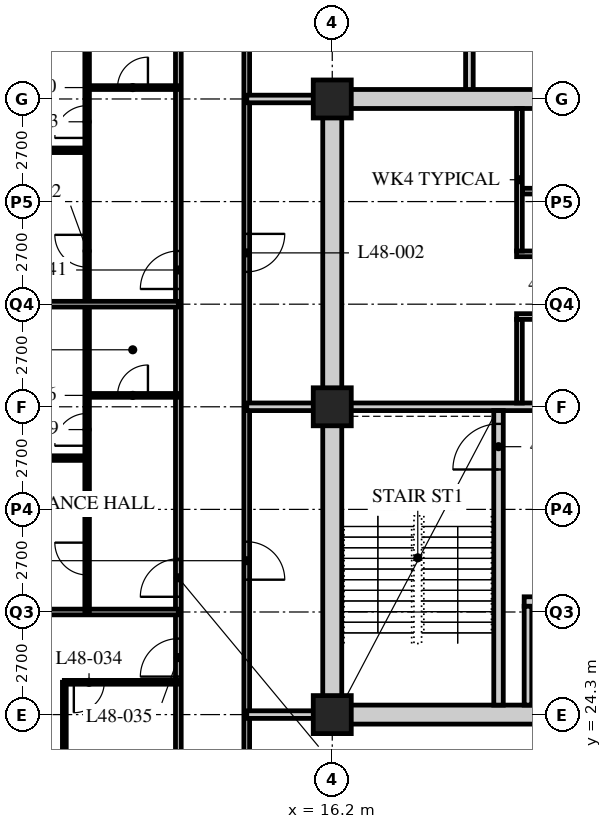
"""IFC4 building model, lengths in metres.
Left out: names, types, materials, properties, quantities, classifications, styles, units other than length and angle.
Written with IfcOpenShell. Run it as: python <this file> out.ifc"""

import sys

from ifc_helpers import new_model, si_unit, direction, frame, frame_2d, origin, origin_2d, place, context, subcontext, project, spatial, rectangle, hollow_rectangle, extrude, element, fill, save


model = new_model("IFC4")
c1 = context("Model", 3, precision=1e-05, world=origin(), true_north=direction((0.0, 1.0)))
c2 = subcontext(c1, "Body", "Model", "MODEL_VIEW")
j1 = project(units=[si_unit("LENGTHUNIT", "METRE"), si_unit("PLANEANGLEUNIT", "RADIAN")], contexts=[c1])
p1 = place(None, origin())
s1 = spatial("IfcSite", under=j1, at=p1, CompositionType="ELEMENT")
p2 = place(p1, origin())
s2 = spatial("IfcBuilding", under=s1, at=p2, CompositionType="ELEMENT")
p3 = place(p2, frame((0.0, 0.0, 188.4)))
s3 = spatial("IfcBuildingStorey", under=s2, at=p3, CompositionType="ELEMENT", Elevation=188.4)
for number, where, z_axis, x_axis in (
    (1, (16.2, 24.3, 0.0), (0.0, 0.0, 1.0), (1.0, 0.0, 0.0)),
    (2, (16.2, 32.4, 0.0), (0.0, 0.0, 1.0), (1.0, 0.0, 0.0)),
    (3, (16.2, 40.5, 0.0), (0.0, 0.0, 1.0), (1.0, 0.0, 0.0)),
):
    element("IfcColumn", number, at=place(p3, frame(where, z_axis=z_axis, x_axis=x_axis)), inside=s3, PredefinedType="COLUMN", context=c2, shape_type="SweptSolid", body=[
        extrude(hollow_rectangle(XDim=1.0, YDim=1.0, WallThickness=0.1, at=origin_2d()), origin(), (0.0, 0.0, 1.0), 3.6),
    ])
p4 = place(p3, frame((12.15, 18.9, 0.0), z_axis=(0.0, 0.0, 1.0), x_axis=(0.0, 1.0, 0.0)))
e4 = element("IfcWall", 4, at=p4, inside=s3, PredefinedType="PARTITIONING", context=c2, shape_type="SweptSolid", body=[
    extrude(rectangle(XDim=28.35, YDim=0.15, at=frame_2d((14.175, 0.0))), origin(), (0.0, 0.0, 1.0), 3.39),
])
p5 = place(p4, frame((2.35, 0.0, 0.0)))
e5 = element("IfcOpeningElement", 5, at=p5, cuts=e4, PredefinedType="OPENING", context=c2, shape_type="SweptSolid", body=[
    extrude(rectangle(XDim=1.0, YDim=2.1, at=frame_2d((0.5, 1.05))), frame((0.0, 0.085, 0.0), z_axis=(0.0, -1.0, 0.0), x_axis=(1.0, 0.0, 0.0)), (0.0, 0.0, 1.0), 0.17),
])
p6 = place(p4, frame((6.4, 0.0, 0.0)))
e6 = element("IfcOpeningElement", 6, at=p6, cuts=e4, PredefinedType="OPENING", context=c2, shape_type="SweptSolid", body=[
    extrude(rectangle(XDim=1.0, YDim=2.1, at=frame_2d((0.5, 1.05))), frame((0.0, 0.085, 0.0), z_axis=(0.0, -1.0, 0.0), x_axis=(1.0, 0.0, 0.0)), (0.0, 0.0, 1.0), 0.17),
])
p7 = place(p4, frame((8.5, 0.0, 0.0)))
e7 = element("IfcOpeningElement", 7, at=p7, cuts=e4, PredefinedType="OPENING", context=c2, shape_type="SweptSolid", body=[
    extrude(rectangle(XDim=1.0, YDim=2.1, at=frame_2d((0.5, 1.05))), frame((0.0, 0.085, 0.0), z_axis=(0.0, -1.0, 0.0), x_axis=(1.0, 0.0, 0.0)), (0.0, 0.0, 1.0), 0.17),
])
p8 = place(p4, frame((16.6, 0.0, 0.0)))
e8 = element("IfcOpeningElement", 8, at=p8, cuts=e4, PredefinedType="OPENING", context=c2, shape_type="SweptSolid", body=[
    extrude(rectangle(XDim=1.0, YDim=2.1, at=frame_2d((0.5, 1.05))), frame((0.0, 0.085, 0.0), z_axis=(0.0, -1.0, 0.0), x_axis=(1.0, 0.0, 0.0)), (0.0, 0.0, 1.0), 0.17),
])
p9 = place(p4, frame((26.65, 0.0, 0.0)))
e9 = element("IfcOpeningElement", 9, at=p9, cuts=e4, PredefinedType="OPENING", context=c2, shape_type="SweptSolid", body=[
    extrude(rectangle(XDim=1.0, YDim=2.1, at=frame_2d((0.5, 1.05))), frame((0.0, 0.085, 0.0), z_axis=(0.0, -1.0, 0.0), x_axis=(1.0, 0.0, 0.0)), (0.0, 0.0, 1.0), 0.17),
])
p10 = place(p3, frame((13.95, 45.45, 0.0), z_axis=(0.0, 0.0, 1.0), x_axis=(0.0, -1.0, 0.0)))
e10 = element("IfcWall", 10, at=p10, inside=s3, PredefinedType="PARTITIONING", context=c2, shape_type="SweptSolid", body=[
    extrude(rectangle(XDim=24.75, YDim=0.15, at=frame_2d((12.375, 0.0))), origin(), (0.0, 0.0, 1.0), 3.39),
])
p11 = place(p10, frame((16.6, 0.0, 0.0)))
e11 = element("IfcOpeningElement", 11, at=p11, cuts=e10, PredefinedType="OPENING", context=c2, shape_type="SweptSolid", body=[
    extrude(rectangle(XDim=1.0, YDim=2.1, at=frame_2d((0.5, 1.05))), frame((0.0, 0.085, 0.0), z_axis=(0.0, -1.0, 0.0), x_axis=(1.0, 0.0, 0.0)), (0.0, 0.0, 1.0), 0.17),
])
p12 = place(p10, frame((8.5, 0.0, 0.0)))
e12 = element("IfcOpeningElement", 12, at=p12, cuts=e10, PredefinedType="OPENING", context=c2, shape_type="SweptSolid", body=[
    extrude(rectangle(XDim=1.0, YDim=2.1, at=frame_2d((0.5, 1.05))), frame((0.0, 0.085, 0.0), z_axis=(0.0, -1.0, 0.0), x_axis=(1.0, 0.0, 0.0)), (0.0, 0.0, 1.0), 0.17),
])
p13 = place(p3, frame((13.95, 32.4, 0.0), z_axis=(0.0, 0.0, 1.0), x_axis=(1.0, 0.0, 0.0)))
e13 = element("IfcWall", 13, at=p13, inside=s3, PredefinedType="SOLIDWALL", context=c2, shape_type="SweptSolid", body=[
    extrude(rectangle(XDim=2.25, YDim=0.2, at=frame_2d((1.125, 0.0))), origin(), (0.0, 0.0, 1.0), 3.39),
])
p14 = place(p3, frame((19.809, 45.45, 0.0), z_axis=(0.0, 0.0, 1.0), x_axis=(0.0, -1.0, 0.0)))
e14 = element("IfcWall", 14, at=p14, inside=s3, PredefinedType="SOLIDWALL", context=c2, shape_type="SweptSolid", body=[
    extrude(rectangle(XDim=4.95, YDim=0.2, at=frame_2d((2.475, 0.0))), origin(), (0.0, 0.0, 1.0), 3.39),
])
for number, where, z_axis, x_axis in (
    (15, (13.95, 24.3, 0.0), (0.0, 0.0, 1.0), (1.0, 0.0, 0.0)),
    (16, (13.95, 40.5, 0.0), (0.0, 0.0, 1.0), (1.0, 0.0, 0.0)),
):
    element("IfcWall", number, at=place(p3, frame(where, z_axis=z_axis, x_axis=x_axis)), inside=s3, PredefinedType="SOLIDWALL", context=c2, shape_type="SweptSolid", body=[
        extrude(rectangle(XDim=2.25, YDim=0.2, at=frame_2d((1.125, 0.0))), origin(), (0.0, 0.0, 1.0), 3.39),
    ])
p15 = place(p3, frame((9.15, 22.95, 0.0), z_axis=(0.0, 0.0, 1.0), x_axis=(0.0, 1.0, 0.0)))
e17 = element("IfcWall", 17, at=p15, inside=s3, PredefinedType="PARTITIONING", context=c2, shape_type="SweptSolid", body=[
    extrude(rectangle(XDim=2.2, YDim=0.1, at=frame_2d((1.1, 0.0))), origin(), (0.0, 0.0, 1.0), 3.39),
])
p16 = place(p3, frame((12.15, 25.15, 0.0), z_axis=(0.0, 0.0, 1.0), x_axis=(-1.0, 0.0, 0.0)))
e18 = element("IfcWall", 18, at=p16, inside=s3, PredefinedType="PARTITIONING", context=c2, shape_type="SweptSolid", body=[
    extrude(rectangle(XDim=3.0, YDim=0.1, at=frame_2d((1.5, 0.0))), origin(), (0.0, 0.0, 1.0), 3.39),
])
p17 = place(p16, frame((1.95, 0.0, 0.0)))
e19 = element("IfcOpeningElement", 19, at=p17, cuts=e18, PredefinedType="OPENING", context=c2, shape_type="SweptSolid", body=[
    extrude(rectangle(XDim=0.8, YDim=2.1, at=frame_2d((0.4, 1.05))), frame((0.0, 0.06, 0.0), z_axis=(0.0, -1.0, 0.0), x_axis=(1.0, 0.0, 0.0)), (0.0, 0.0, 1.0), 0.12),
])
p18 = place(p3, frame((12.15, 27.0, 0.0), z_axis=(0.0, 0.0, 1.0), x_axis=(-1.0, 0.0, 0.0)))
e20 = element("IfcWall", 20, at=p18, inside=s3, PredefinedType="PARTITIONING", context=c2, shape_type="SweptSolid", body=[
    extrude(rectangle(XDim=11.85, YDim=0.15, at=frame_2d((5.925, 0.0))), origin(), (0.0, 0.0, 1.0), 2.778),
])
p19 = place(p3, frame((9.75, 27.0, 0.0), z_axis=(0.0, 0.0, 1.0), x_axis=(0.0, 1.0, 0.0)))
e21 = element("IfcWall", 21, at=p19, inside=s3, PredefinedType="PARTITIONING", context=c2, shape_type="SweptSolid", body=[
    extrude(rectangle(XDim=16.2, YDim=0.12, at=frame_2d((8.1, 0.0))), origin(), (0.0, 0.0, 1.0), 3.39),
])
p20 = place(p19, frame((0.975, 0.0, 0.0)))
e22 = element("IfcOpeningElement", 22, at=p20, cuts=e21, PredefinedType="OPENING", context=c2, shape_type="SweptSolid", body=[
    extrude(rectangle(XDim=0.85, YDim=2.1, at=frame_2d((0.425, 1.05))), frame((0.0, 0.07, 0.0), z_axis=(0.0, -1.0, 0.0), x_axis=(1.0, 0.0, 0.0)), (0.0, 0.0, 1.0), 0.14),
])
p21 = place(p19, frame((4.375, 0.0, 0.0)))
e23 = element("IfcOpeningElement", 23, at=p21, cuts=e21, PredefinedType="OPENING", context=c2, shape_type="SweptSolid", body=[
    extrude(rectangle(XDim=0.85, YDim=2.1, at=frame_2d((0.425, 1.05))), frame((0.0, 0.07, 0.0), z_axis=(0.0, -1.0, 0.0), x_axis=(1.0, 0.0, 0.0)), (0.0, 0.0, 1.0), 0.14),
])
p22 = place(p19, frame((9.075, 0.0, 0.0)))
e24 = element("IfcOpeningElement", 24, at=p22, cuts=e21, PredefinedType="OPENING", context=c2, shape_type="SweptSolid", body=[
    extrude(rectangle(XDim=0.85, YDim=2.1, at=frame_2d((0.425, 1.05))), frame((0.0, 0.07, 0.0), z_axis=(0.0, -1.0, 0.0), x_axis=(1.0, 0.0, 0.0)), (0.0, 0.0, 1.0), 0.14),
])
p23 = place(p19, frame((12.475, 0.0, 0.0)))
e25 = element("IfcOpeningElement", 25, at=p23, cuts=e21, PredefinedType="OPENING", context=c2, shape_type="SweptSolid", body=[
    extrude(rectangle(XDim=0.85, YDim=2.1, at=frame_2d((0.425, 1.05))), frame((0.0, 0.07, 0.0), z_axis=(0.0, -1.0, 0.0), x_axis=(1.0, 0.0, 0.0)), (0.0, 0.0, 1.0), 0.14),
])
p24 = place(p3, frame((12.15, 32.7, 0.0), z_axis=(0.0, 0.0, 1.0), x_axis=(-1.0, 0.0, 0.0)))
e26 = element("IfcWall", 26, at=p24, inside=s3, PredefinedType="PARTITIONING", context=c2, shape_type="SweptSolid", body=[
    extrude(rectangle(XDim=2.4, YDim=0.1, at=frame_2d((1.2, 0.0))), origin(), (0.0, 0.0, 1.0), 3.39),
])
p25 = place(p24, frame((0.8, 0.0, 0.0)))
e27 = element("IfcOpeningElement", 27, at=p25, cuts=e26, PredefinedType="OPENING", context=c2, shape_type="SweptSolid", body=[
    extrude(rectangle(XDim=0.8, YDim=2.1, at=frame_2d((0.4, 1.05))), frame((0.0, 0.06, 0.0), z_axis=(0.0, -1.0, 0.0), x_axis=(1.0, 0.0, 0.0)), (0.0, 0.0, 1.0), 0.12),
])
p26 = place(p3, frame((9.75, 31.05, 0.0), z_axis=(0.0, 0.0, 1.0), x_axis=(-1.0, 0.0, 0.0)))
e28 = element("IfcWall", 28, at=p26, inside=s3, PredefinedType="PARTITIONING", context=c2, shape_type="SweptSolid", body=[
    extrude(rectangle(XDim=9.45, YDim=0.12, at=frame_2d((4.725, 0.0))), origin(), (0.0, 0.0, 1.0), 3.39),
])
p27 = place(p3, frame((12.15, 35.1, 0.0), z_axis=(0.0, 0.0, 1.0), x_axis=(-1.0, 0.0, 0.0)))
e29 = element("IfcWall", 29, at=p27, inside=s3, PredefinedType="PARTITIONING", context=c2, shape_type="SweptSolid", body=[
    extrude(rectangle(XDim=11.85, YDim=0.15, at=frame_2d((5.925, 0.0))), origin(), (0.0, 0.0, 1.0), 2.778),
])
p28 = place(p3, frame((12.15, 40.8, 0.0), z_axis=(0.0, 0.0, 1.0), x_axis=(-1.0, 0.0, 0.0)))
e30 = element("IfcWall", 30, at=p28, inside=s3, PredefinedType="PARTITIONING", context=c2, shape_type="SweptSolid", body=[
    extrude(rectangle(XDim=2.4, YDim=0.1, at=frame_2d((1.2, 0.0))), origin(), (0.0, 0.0, 1.0), 3.39),
])
p29 = place(p28, frame((0.8, 0.0, 0.0)))
e31 = element("IfcOpeningElement", 31, at=p29, cuts=e30, PredefinedType="OPENING", context=c2, shape_type="SweptSolid", body=[
    extrude(rectangle(XDim=0.8, YDim=2.1, at=frame_2d((0.4, 1.05))), frame((0.0, 0.06, 0.0), z_axis=(0.0, -1.0, 0.0), x_axis=(1.0, 0.0, 0.0)), (0.0, 0.0, 1.0), 0.12),
])
p30 = place(p3, frame((9.75, 39.15, 0.0), z_axis=(0.0, 0.0, 1.0), x_axis=(-1.0, 0.0, 0.0)))
e32 = element("IfcWall", 32, at=p30, inside=s3, PredefinedType="PARTITIONING", context=c2, shape_type="SweptSolid", body=[
    extrude(rectangle(XDim=9.45, YDim=0.12, at=frame_2d((4.725, 0.0))), origin(), (0.0, 0.0, 1.0), 3.39),
])
p31 = place(p3, frame((15.95, 24.3, 0.0), z_axis=(0.0, 0.0, 1.0), x_axis=(1.0, 0.0, 0.0)))
e33 = element("IfcWall", 33, at=p31, inside=s3, PredefinedType="SOLIDWALL", context=c2, shape_type="SweptSolid", body=[
    extrude(rectangle(XDim=24.8, YDim=0.5, at=frame_2d((12.4, 0.0))), origin(), (0.0, 0.0, 1.0), 2.74),
])
p32 = place(p31, frame((11.5, 0.0, 0.0)))
e34 = element("IfcOpeningElement", 34, at=p32, cuts=e33, PredefinedType="OPENING", context=c2, shape_type="SweptSolid", body=[
    extrude(rectangle(XDim=1.8, YDim=2.4, at=frame_2d((0.9, 1.2))), frame((0.0, 0.26, 0.0), z_axis=(0.0, -1.0, 0.0), x_axis=(1.0, 0.0, 0.0)), (0.0, 0.0, 1.0), 0.52),
])
p33 = place(p3, frame((15.95, 40.5, 0.0), z_axis=(0.0, 0.0, 1.0), x_axis=(1.0, 0.0, 0.0)))
e35 = element("IfcWall", 35, at=p33, inside=s3, PredefinedType="SOLIDWALL", context=c2, shape_type="SweptSolid", body=[
    extrude(rectangle(XDim=24.8, YDim=0.5, at=frame_2d((12.4, 0.0))), origin(), (0.0, 0.0, 1.0), 2.74),
])
p34 = place(p33, frame((11.5, 0.0, 0.0)))
e36 = element("IfcOpeningElement", 36, at=p34, cuts=e35, PredefinedType="OPENING", context=c2, shape_type="SweptSolid", body=[
    extrude(rectangle(XDim=1.8, YDim=2.4, at=frame_2d((0.9, 1.2))), frame((0.0, 0.26, 0.0), z_axis=(0.0, -1.0, 0.0), x_axis=(1.0, 0.0, 0.0)), (0.0, 0.0, 1.0), 0.52),
])
p35 = place(p3, frame((16.2, 24.55, 0.0), z_axis=(0.0, 0.0, 1.0), x_axis=(0.0, 1.0, 0.0)))
e37 = element("IfcWall", 37, at=p35, inside=s3, PredefinedType="SOLIDWALL", context=c2, shape_type="SweptSolid", body=[
    extrude(rectangle(XDim=15.7, YDim=0.5, at=frame_2d((7.85, 0.0))), origin(), (0.0, 0.0, 1.0), 2.778),
])
p36 = place(p3, frame((16.45, 32.4, 0.0), z_axis=(0.0, 0.0, 1.0), x_axis=(1.0, 0.0, 0.0)))
e38 = element("IfcWall", 38, at=p36, inside=s3, PredefinedType="SOLIDWALL", context=c2, shape_type="SweptSolid", body=[
    extrude(rectangle(XDim=7.95, YDim=0.2, at=frame_2d((3.975, 0.0))), origin(), (0.0, 0.0, 1.0), 2.778),
])
p37 = place(p3, frame((20.575, 24.55, 0.0), z_axis=(0.0, 0.0, 1.0), x_axis=(0.0, 1.0, 0.0)))
e39 = element("IfcWall", 39, at=p37, inside=s3, PredefinedType="SOLIDWALL", context=c2, shape_type="SweptSolid", body=[
    extrude(rectangle(XDim=7.75, YDim=0.25, at=frame_2d((3.875, 0.0))), origin(), (0.0, 0.0, 1.0), 3.39),
])
p38 = place(p37, frame((6.2, 0.0, 0.0)))
e40 = element("IfcOpeningElement", 40, at=p38, cuts=e39, PredefinedType="OPENING", context=c2, shape_type="SweptSolid", body=[
    extrude(rectangle(XDim=1.2, YDim=2.1, at=frame_2d((0.6, 1.05))), frame((0.0, 0.135, 0.0), z_axis=(0.0, -1.0, 0.0), x_axis=(1.0, 0.0, 0.0)), (0.0, 0.0, 1.0), 0.27),
])
p39 = place(p3, frame((21.25, 27.275, 0.0), z_axis=(0.0, 0.0, 1.0), x_axis=(1.0, 0.0, 0.0)))
e41 = element("IfcWall", 41, at=p39, inside=s3, PredefinedType="SOLIDWALL", context=c2, shape_type="SweptSolid", body=[
    extrude(rectangle(XDim=2.95, YDim=0.25, at=frame_2d((1.475, 0.0))), origin(), (0.0, 0.0, 1.0), 3.39),
])
p40 = place(p39, frame((0.95, 0.0, 0.0)))
e42 = element("IfcOpeningElement", 42, at=p40, cuts=e41, PredefinedType="OPENING", context=c2, shape_type="SweptSolid", body=[
    extrude(rectangle(XDim=1.1, YDim=2.4, at=frame_2d((0.55, 1.2))), frame((0.0, 0.135, 0.0), z_axis=(0.0, -1.0, 0.0), x_axis=(1.0, 0.0, 0.0)), (0.0, 0.0, 1.0), 0.27),
])
p41 = place(p3, frame((21.35, 24.55, 0.0), z_axis=(0.0, 0.0, 1.0), x_axis=(0.0, 1.0, 0.0)))
e43 = element("IfcWall", 43, at=p41, inside=s3, PredefinedType="SOLIDWALL", context=c2, shape_type="SweptSolid", body=[
    extrude(rectangle(XDim=2.6, YDim=0.2, at=frame_2d((1.3, 0.0))), origin(), (0.0, 0.0, 1.0), 3.39),
])
for number, where, z_axis, x_axis in (
    (44, (21.05, 34.775, 0.0), (0.0, 0.0, 1.0), (1.0, 0.0, 0.0)),
    (45, (21.05, 36.425, 0.0), (0.0, 0.0, 1.0), (1.0, 0.0, 0.0)),
):
    element("IfcWall", number, at=place(p3, frame(where, z_axis=z_axis, x_axis=x_axis)), inside=s3, PredefinedType="PARTITIONING", context=c2, shape_type="SweptSolid", body=[
        extrude(rectangle(XDim=3.15, YDim=0.15, at=frame_2d((1.575, 0.0))), origin(), (0.0, 0.0, 1.0), 3.39),
    ])
p42 = place(p3, frame((21.2, 38.075, 0.0), z_axis=(0.0, 0.0, 1.0), x_axis=(1.0, 0.0, 0.0)))
e46 = element("IfcWall", 46, at=p42, inside=s3, PredefinedType="PARTITIONING", context=c2, shape_type="SweptSolid", body=[
    extrude(rectangle(XDim=3.0, YDim=0.15, at=frame_2d((1.5, 0.0))), origin(), (0.0, 0.0, 1.0), 3.39),
])
p43 = place(p3, frame((21.125, 32.5, 0.0), z_axis=(0.0, 0.0, 1.0), x_axis=(0.0, 1.0, 0.0)))
e47 = element("IfcWall", 47, at=p43, inside=s3, PredefinedType="PARTITIONING", context=c2, shape_type="SweptSolid", body=[
    extrude(rectangle(XDim=2.2, YDim=0.15, at=frame_2d((1.1, 0.0))), origin(), (0.0, 0.0, 1.0), 3.39),
])
p44 = place(p3, frame((21.125, 36.5, 0.0), z_axis=(0.0, 0.0, 1.0), x_axis=(0.0, 1.0, 0.0)))
e48 = element("IfcWall", 48, at=p44, inside=s3, PredefinedType="PARTITIONING", context=c2, shape_type="SweptSolid", body=[
    extrude(rectangle(XDim=3.75, YDim=0.15, at=frame_2d((1.875, 0.0))), origin(), (0.0, 0.0, 1.0), 3.39),
])
p45 = place(p11, origin())
e49 = element("IfcDoor", 49, at=p45, inside=s3, OperationType="SINGLE_SWING_RIGHT", PredefinedType="DOOR", context=c2, shape_type="SweptSolid", body=[
    extrude(rectangle(XDim=1.0, YDim=2.1, at=frame_2d((0.5, 1.05))), frame((0.0, 0.025, 0.0), z_axis=(0.0, -1.0, 0.0), x_axis=(1.0, 0.0, 0.0)), (0.0, 0.0, 1.0), 0.05),
])
fill(e11, e49)
p46 = place(p12, origin())
e50 = element("IfcDoor", 50, at=p46, inside=s3, OperationType="SINGLE_SWING_LEFT", PredefinedType="DOOR", context=c2, shape_type="SweptSolid", body=[
    extrude(rectangle(XDim=1.0, YDim=2.1, at=frame_2d((0.5, 1.05))), frame((0.0, 0.025, 0.0), z_axis=(0.0, -1.0, 0.0), x_axis=(1.0, 0.0, 0.0)), (0.0, 0.0, 1.0), 0.05),
])
fill(e12, e50)
p47 = place(p17, origin())
e51 = element("IfcDoor", 51, at=p47, inside=s3, OperationType="SINGLE_SWING_RIGHT", PredefinedType="DOOR", context=c2, shape_type="SweptSolid", body=[
    extrude(rectangle(XDim=0.8, YDim=2.1, at=frame_2d((0.4, 1.05))), frame((0.0, 0.025, 0.0), z_axis=(0.0, -1.0, 0.0), x_axis=(1.0, 0.0, 0.0)), (0.0, 0.0, 1.0), 0.05),
])
fill(e19, e51)
p48 = place(p6, origin())
e52 = element("IfcDoor", 52, at=p48, inside=s3, OperationType="SINGLE_SWING_LEFT", PredefinedType="DOOR", context=c2, shape_type="SweptSolid", body=[
    extrude(rectangle(XDim=1.0, YDim=2.1, at=frame_2d((0.5, 1.05))), frame((0.0, 0.025, 0.0), z_axis=(0.0, -1.0, 0.0), x_axis=(1.0, 0.0, 0.0)), (0.0, 0.0, 1.0), 0.05),
])
fill(e6, e52)
p49 = place(p25, origin())
e53 = element("IfcDoor", 53, at=p49, inside=s3, OperationType="SINGLE_SWING_RIGHT", PredefinedType="DOOR", context=c2, shape_type="SweptSolid", body=[
    extrude(rectangle(XDim=0.8, YDim=2.1, at=frame_2d((0.4, 1.05))), frame((0.0, 0.025, 0.0), z_axis=(0.0, -1.0, 0.0), x_axis=(1.0, 0.0, 0.0)), (0.0, 0.0, 1.0), 0.05),
])
fill(e27, e53)
p50 = place(p7, origin())
e54 = element("IfcDoor", 54, at=p50, inside=s3, OperationType="SINGLE_SWING_LEFT", PredefinedType="DOOR", context=c2, shape_type="SweptSolid", body=[
    extrude(rectangle(XDim=1.0, YDim=2.1, at=frame_2d((0.5, 1.05))), frame((0.0, 0.025, 0.0), z_axis=(0.0, -1.0, 0.0), x_axis=(1.0, 0.0, 0.0)), (0.0, 0.0, 1.0), 0.05),
])
fill(e7, e54)
p51 = place(p20, origin())
e55 = element("IfcDoor", 55, at=p51, inside=s3, OperationType="SINGLE_SWING_RIGHT", PredefinedType="DOOR", context=c2, shape_type="SweptSolid", body=[
    extrude(rectangle(XDim=0.85, YDim=2.1, at=frame_2d((0.425, 1.05))), frame((0.0, 0.025, 0.0), z_axis=(0.0, -1.0, 0.0), x_axis=(1.0, 0.0, 0.0)), (0.0, 0.0, 1.0), 0.05),
])
fill(e22, e55)
p52 = place(p21, origin())
e56 = element("IfcDoor", 56, at=p52, inside=s3, OperationType="SINGLE_SWING_LEFT", PredefinedType="DOOR", context=c2, shape_type="SweptSolid", body=[
    extrude(rectangle(XDim=0.85, YDim=2.1, at=frame_2d((0.425, 1.05))), frame((0.0, 0.025, 0.0), z_axis=(0.0, -1.0, 0.0), x_axis=(1.0, 0.0, 0.0)), (0.0, 0.0, 1.0), 0.05),
])
fill(e23, e56)
p53 = place(p29, origin())
e57 = element("IfcDoor", 57, at=p53, inside=s3, OperationType="SINGLE_SWING_RIGHT", PredefinedType="DOOR", context=c2, shape_type="SweptSolid", body=[
    extrude(rectangle(XDim=0.8, YDim=2.1, at=frame_2d((0.4, 1.05))), frame((0.0, 0.025, 0.0), z_axis=(0.0, -1.0, 0.0), x_axis=(1.0, 0.0, 0.0)), (0.0, 0.0, 1.0), 0.05),
])
fill(e31, e57)
p54 = place(p8, origin())
e58 = element("IfcDoor", 58, at=p54, inside=s3, OperationType="SINGLE_SWING_LEFT", PredefinedType="DOOR", context=c2, shape_type="SweptSolid", body=[
    extrude(rectangle(XDim=1.0, YDim=2.1, at=frame_2d((0.5, 1.05))), frame((0.0, 0.025, 0.0), z_axis=(0.0, -1.0, 0.0), x_axis=(1.0, 0.0, 0.0)), (0.0, 0.0, 1.0), 0.05),
])
fill(e8, e58)
p55 = place(p22, origin())
e59 = element("IfcDoor", 59, at=p55, inside=s3, OperationType="SINGLE_SWING_RIGHT", PredefinedType="DOOR", context=c2, shape_type="SweptSolid", body=[
    extrude(rectangle(XDim=0.85, YDim=2.1, at=frame_2d((0.425, 1.05))), frame((0.0, 0.025, 0.0), z_axis=(0.0, -1.0, 0.0), x_axis=(1.0, 0.0, 0.0)), (0.0, 0.0, 1.0), 0.05),
])
fill(e24, e59)
p56 = place(p23, origin())
e60 = element("IfcDoor", 60, at=p56, inside=s3, OperationType="SINGLE_SWING_LEFT", PredefinedType="DOOR", context=c2, shape_type="SweptSolid", body=[
    extrude(rectangle(XDim=0.85, YDim=2.1, at=frame_2d((0.425, 1.05))), frame((0.0, 0.025, 0.0), z_axis=(0.0, -1.0, 0.0), x_axis=(1.0, 0.0, 0.0)), (0.0, 0.0, 1.0), 0.05),
])
fill(e25, e60)
p57 = place(p38, origin())
e61 = element("IfcDoor", 61, at=p57, inside=s3, OperationType="SINGLE_SWING_LEFT", PredefinedType="DOOR", context=c2, shape_type="SweptSolid", body=[
    extrude(rectangle(XDim=1.2, YDim=2.1, at=frame_2d((0.6, 1.05))), frame((0.0, 0.025, 0.0), z_axis=(0.0, -1.0, 0.0), x_axis=(1.0, 0.0, 0.0)), (0.0, 0.0, 1.0), 0.05),
])
fill(e40, e61)
save(model, sys.argv[1])
